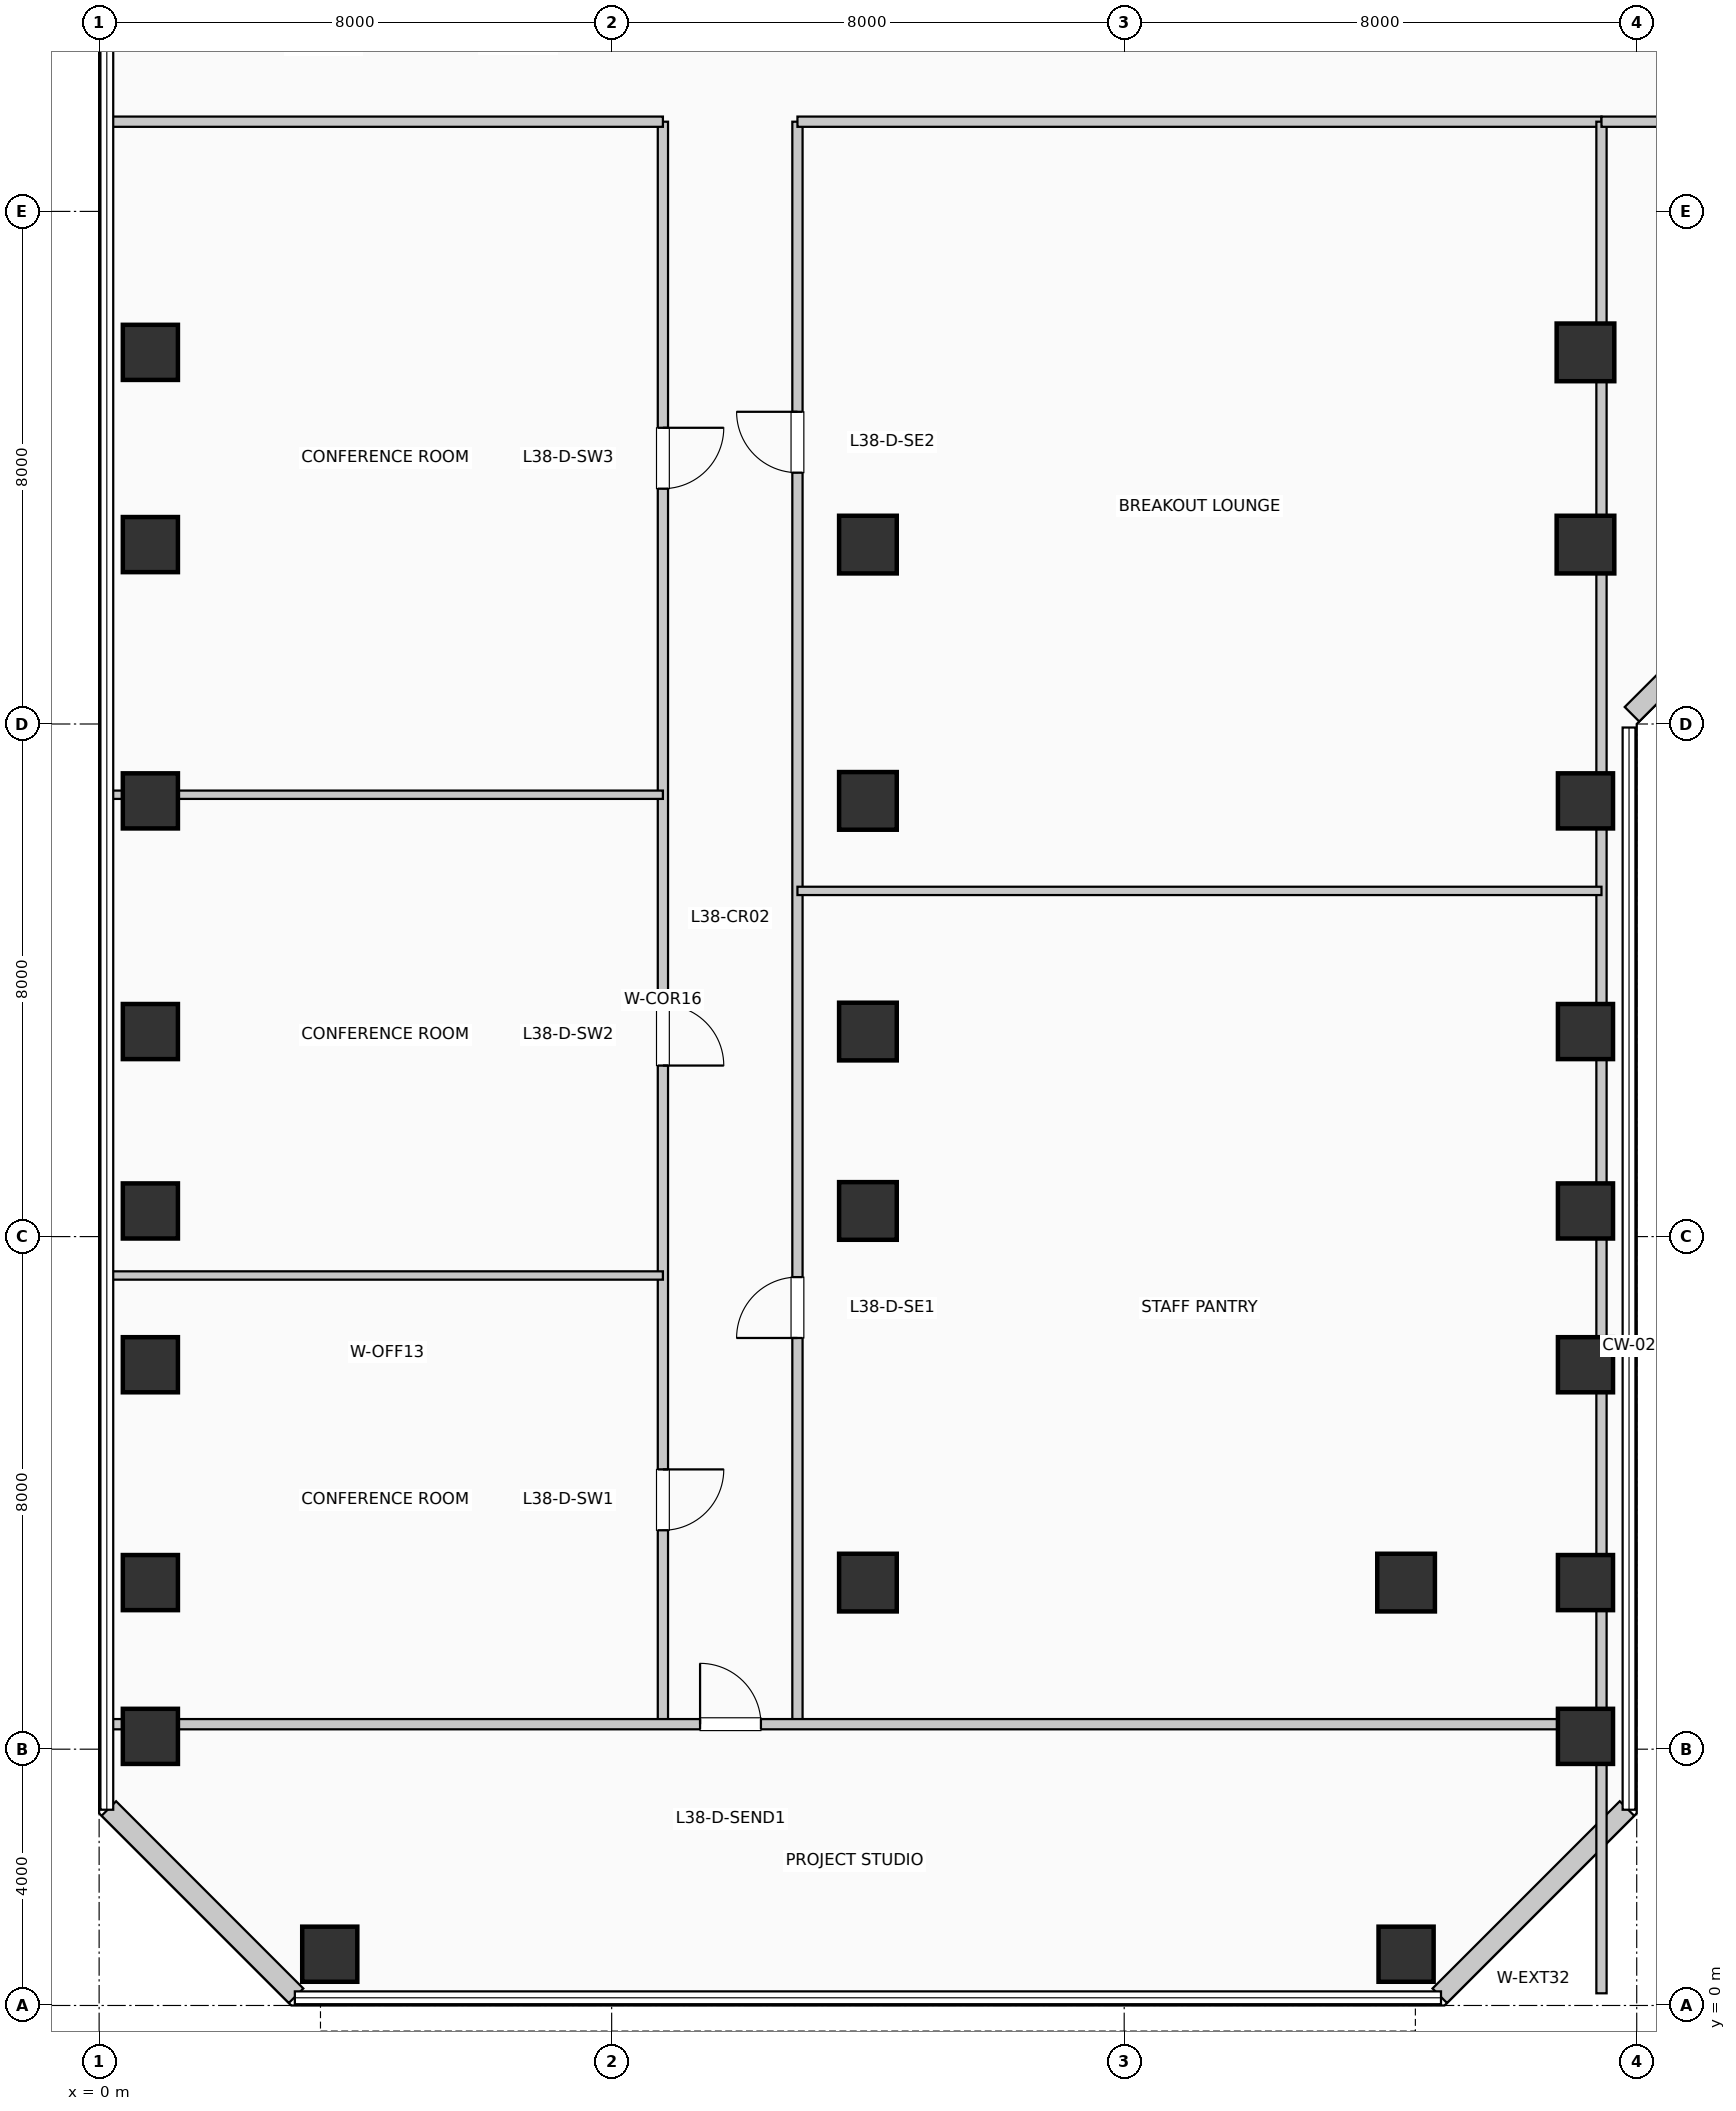
"""IFC4 building model, lengths in metres.
Left out: names, types, materials, properties, quantities, classifications, styles, units other than length and angle.
Written with IfcOpenShell. Run it as: python <this file> out.ifc"""

import sys

from ifc_helpers import new_model, si_unit, direction, frame, frame_2d, origin, origin_2d, place, context, subcontext, project, spatial, rectangle, extrude, element, fill, save


model = new_model("IFC4")
c1 = context("Model", 3, precision=1e-05, world=origin(), true_north=direction((0.0, 1.0)))
c2 = subcontext(c1, "Body", "Model", "MODEL_VIEW")
j1 = project(units=[si_unit("LENGTHUNIT", "METRE"), si_unit("PLANEANGLEUNIT", "RADIAN")], contexts=[c1])
p1 = place(None, origin())
s1 = spatial("IfcSite", under=j1, at=p1, CompositionType="ELEMENT")
p2 = place(p1, origin())
s2 = spatial("IfcBuilding", under=s1, at=p2, CompositionType="ELEMENT")
p3 = place(p2, frame((0.0, 0.0, 158.73)))
s3 = spatial("IfcBuildingStorey", under=s2, at=p3, CompositionType="ELEMENT", Elevation=158.73)
for number, where, z_axis, x_axis in (
    (1, (0.8, 4.2, 0.0), (0.0, 0.0, 1.0), (1.0, 0.0, 0.0)),
    (2, (0.8, 6.6, 0.0), (0.0, 0.0, 1.0), (1.0, 0.0, 0.0)),
    (3, (0.8, 10.0, 0.0), (0.0, 0.0, 1.0), (1.0, 0.0, 0.0)),
    (4, (0.8, 12.4, 0.0), (0.0, 0.0, 1.0), (1.0, 0.0, 0.0)),
    (5, (0.8, 15.2, 0.0), (0.0, 0.0, 1.0), (1.0, 0.0, 0.0)),
    (6, (0.8, 18.8, 0.0), (0.0, 0.0, 1.0), (1.0, 0.0, 0.0)),
    (7, (0.8, 22.8, 0.0), (0.0, 0.0, 1.0), (1.0, 0.0, 0.0)),
    (8, (0.8, 25.8, 0.0), (0.0, 0.0, 1.0), (1.0, 0.0, 0.0)),
    (9, (3.6, 0.8, 0.0), (0.0, 0.0, 1.0), (1.0, 0.0, 0.0)),
):
    element("IfcColumn", number, at=place(p3, frame(where, z_axis=z_axis, x_axis=x_axis)), inside=s3, PredefinedType="COLUMN", context=c2, shape_type="SweptSolid", body=[
        extrude(rectangle(XDim=0.86, YDim=0.86, at=origin_2d()), origin(), (0.0, 0.0, 1.0), 3.96),
    ])
for number, where, z_axis, x_axis in (
    (10, (12.0, 6.6, 0.0), (0.0, 0.0, 1.0), (1.0, 0.0, 0.0)),
    (11, (12.0, 12.4, 0.0), (0.0, 0.0, 1.0), (1.0, 0.0, 0.0)),
    (12, (12.0, 15.2, 0.0), (0.0, 0.0, 1.0), (1.0, 0.0, 0.0)),
    (13, (12.0, 18.8, 0.0), (0.0, 0.0, 1.0), (1.0, 0.0, 0.0)),
    (14, (12.0, 22.8, 0.0), (0.0, 0.0, 1.0), (1.0, 0.0, 0.0)),
):
    element("IfcColumn", number, at=place(p3, frame(where, z_axis=z_axis, x_axis=x_axis)), inside=s3, PredefinedType="COLUMN", context=c2, shape_type="SweptSolid", body=[
        extrude(rectangle(XDim=0.9, YDim=0.9, at=origin_2d()), origin(), (0.0, 0.0, 1.0), 3.96),
    ])
p4 = place(p3, frame((20.4, 0.8, 0.0), z_axis=(0.0, 0.0, 1.0), x_axis=(1.0, 0.0, 0.0)))
e15 = element("IfcColumn", 15, at=p4, inside=s3, PredefinedType="COLUMN", context=c2, shape_type="SweptSolid", body=[
    extrude(rectangle(XDim=0.86, YDim=0.86, at=origin_2d()), origin(), (0.0, 0.0, 1.0), 3.96),
])
p5 = place(p3, frame((20.4, 6.6, 0.0), z_axis=(0.0, 0.0, 1.0), x_axis=(1.0, 0.0, 0.0)))
e16 = element("IfcColumn", 16, at=p5, inside=s3, PredefinedType="COLUMN", context=c2, shape_type="SweptSolid", body=[
    extrude(rectangle(XDim=0.9, YDim=0.9, at=origin_2d()), origin(), (0.0, 0.0, 1.0), 3.96),
])
for number, where, z_axis, x_axis in (
    (17, (23.2, 4.2, 0.0), (0.0, 0.0, 1.0), (1.0, 0.0, 0.0)),
    (18, (23.2, 6.6, 0.0), (0.0, 0.0, 1.0), (1.0, 0.0, 0.0)),
    (19, (23.2, 10.0, 0.0), (0.0, 0.0, 1.0), (1.0, 0.0, 0.0)),
    (20, (23.2, 12.4, 0.0), (0.0, 0.0, 1.0), (1.0, 0.0, 0.0)),
    (21, (23.2, 15.2, 0.0), (0.0, 0.0, 1.0), (1.0, 0.0, 0.0)),
    (22, (23.2, 18.8, 0.0), (0.0, 0.0, 1.0), (1.0, 0.0, 0.0)),
):
    element("IfcColumn", number, at=place(p3, frame(where, z_axis=z_axis, x_axis=x_axis)), inside=s3, PredefinedType="COLUMN", context=c2, shape_type="SweptSolid", body=[
        extrude(rectangle(XDim=0.86, YDim=0.86, at=origin_2d()), origin(), (0.0, 0.0, 1.0), 3.96),
    ])
for number, where, z_axis, x_axis in (
    (23, (23.2, 22.8, 0.0), (0.0, 0.0, 1.0), (1.0, 0.0, 0.0)),
    (24, (23.2, 25.8, 0.0), (0.0, 0.0, 1.0), (1.0, 0.0, 0.0)),
):
    element("IfcColumn", number, at=place(p3, frame(where, z_axis=z_axis, x_axis=x_axis)), inside=s3, PredefinedType="COLUMN", context=c2, shape_type="SweptSolid", body=[
        extrude(rectangle(XDim=0.9, YDim=0.9, at=origin_2d()), origin(), (0.0, 0.0, 1.0), 3.96),
    ])
p6 = place(p3, frame((20.926, 0.152, 0.0), z_axis=(0.0, 0.0, 1.0), x_axis=(0.707106781187, 0.707106781187, 0.0)))
e25 = element("IfcWall", 25, at=p6, inside=s3, PredefinedType="SOLIDWALL", context=c2, shape_type="SweptSolid", body=[
    extrude(rectangle(XDim=4.133, YDim=0.32, at=frame_2d((2.066, 0.0))), origin(), (0.0, 0.0, 1.0), 3.71),
])
p7 = place(p3, frame((23.926, 20.152, 0.0), z_axis=(0.0, 0.0, 1.0), x_axis=(0.707106781187, 0.707106781187, 0.0)))
e26 = element("IfcWall", 26, at=p7, inside=s3, PredefinedType="SOLIDWALL", context=c2, shape_type="SweptSolid", body=[
    extrude(rectangle(XDim=2.718, YDim=0.32, at=frame_2d((1.359, 0.0))), origin(), (0.0, 0.0, 1.0), 3.71),
])
p8 = place(p3, frame((0.152, 3.074, 0.0), z_axis=(0.0, 0.0, 1.0), x_axis=(0.707106781187, -0.707106781187, 0.0)))
e27 = element("IfcWall", 27, at=p8, inside=s3, PredefinedType="SOLIDWALL", context=c2, shape_type="SweptSolid", body=[
    extrude(rectangle(XDim=4.133, YDim=0.32, at=frame_2d((2.066, 0.0))), origin(), (0.0, 0.0, 1.0), 3.71),
])
p9 = place(p3, frame((8.8, 4.39, 0.0), z_axis=(0.0, 0.0, 1.0), x_axis=(0.0, 1.0, 0.0)))
e28 = element("IfcWall", 28, at=p9, inside=s3, PredefinedType="PARTITIONING", context=c2, shape_type="SweptSolid", body=[
    extrude(rectangle(XDim=25.01, YDim=0.16, at=frame_2d((12.505, 0.0))), origin(), (0.0, 0.0, 1.0), 3.71),
])
p10 = place(p9, frame((3.976, 0.0, 0.0), z_axis=(0.0, 0.0, 1.0), x_axis=(-1.0, 0.0, 0.0)))
e29 = element("IfcOpeningElement", 29, at=p10, cuts=e28, PredefinedType="OPENING", context=c2, shape_type="SweptSolid", body=[
    extrude(rectangle(XDim=0.95, YDim=2.15, at=frame_2d((0.475, 1.075))), frame((0.0, 0.09, 0.0), z_axis=(0.0, -1.0, 0.0), x_axis=(1.0, 0.0, 0.0)), (0.0, 0.0, 1.0), 0.18),
])
p11 = place(p9, frame((11.229, 0.0, 0.0), z_axis=(0.0, 0.0, 1.0), x_axis=(-1.0, 0.0, 0.0)))
e30 = element("IfcOpeningElement", 30, at=p11, cuts=e28, PredefinedType="OPENING", context=c2, shape_type="SweptSolid", body=[
    extrude(rectangle(XDim=0.95, YDim=2.15, at=frame_2d((0.475, 1.075))), frame((0.0, 0.09, 0.0), z_axis=(0.0, -1.0, 0.0), x_axis=(1.0, 0.0, 0.0)), (0.0, 0.0, 1.0), 0.18),
])
p12 = place(p9, frame((20.233, 0.0, 0.0), z_axis=(0.0, 0.0, 1.0), x_axis=(-1.0, 0.0, 0.0)))
e31 = element("IfcOpeningElement", 31, at=p12, cuts=e28, PredefinedType="OPENING", context=c2, shape_type="SweptSolid", body=[
    extrude(rectangle(XDim=0.95, YDim=2.15, at=frame_2d((0.475, 1.075))), frame((0.0, 0.09, 0.0), z_axis=(0.0, -1.0, 0.0), x_axis=(1.0, 0.0, 0.0)), (0.0, 0.0, 1.0), 0.18),
])
p13 = place(p3, frame((10.9, 4.39, 0.0), z_axis=(0.0, 0.0, 1.0), x_axis=(0.0, 1.0, 0.0)))
e32 = element("IfcWall", 32, at=p13, inside=s3, PredefinedType="PARTITIONING", context=c2, shape_type="SweptSolid", body=[
    extrude(rectangle(XDim=25.01, YDim=0.16, at=frame_2d((12.505, 0.0))), origin(), (0.0, 0.0, 1.0), 3.71),
])
p14 = place(p13, frame((6.028, 0.0, 0.0)))
e33 = element("IfcOpeningElement", 33, at=p14, cuts=e32, PredefinedType="OPENING", context=c2, shape_type="SweptSolid", body=[
    extrude(rectangle(XDim=0.95, YDim=2.15, at=frame_2d((0.475, 1.075))), frame((0.0, 0.09, 0.0), z_axis=(0.0, -1.0, 0.0), x_axis=(1.0, 0.0, 0.0)), (0.0, 0.0, 1.0), 0.18),
])
p15 = place(p13, frame((19.533, 0.0, 0.0)))
e34 = element("IfcOpeningElement", 34, at=p15, cuts=e32, PredefinedType="OPENING", context=c2, shape_type="SweptSolid", body=[
    extrude(rectangle(XDim=0.95, YDim=2.15, at=frame_2d((0.475, 1.075))), frame((0.0, 0.09, 0.0), z_axis=(0.0, -1.0, 0.0), x_axis=(1.0, 0.0, 0.0)), (0.0, 0.0, 1.0), 0.18),
])
p16 = place(p3, frame((0.19, 4.39, 0.0), z_axis=(0.0, 0.0, 1.0), x_axis=(1.0, 0.0, 0.0)))
e35 = element("IfcWall", 35, at=p16, inside=s3, PredefinedType="PARTITIONING", context=c2, shape_type="SweptSolid", body=[
    extrude(rectangle(XDim=23.26, YDim=0.16, at=frame_2d((11.63, 0.0))), origin(), (0.0, 0.0, 1.0), 3.045),
])
p17 = place(p16, frame((9.19, 0.0, 0.0)))
e36 = element("IfcOpeningElement", 36, at=p17, cuts=e35, PredefinedType="OPENING", context=c2, shape_type="SweptSolid", body=[
    extrude(rectangle(XDim=0.95, YDim=2.15, at=frame_2d((0.475, 1.075))), frame((0.0, 0.09, 0.0), z_axis=(0.0, -1.0, 0.0), x_axis=(1.0, 0.0, 0.0)), (0.0, 0.0, 1.0), 0.18),
])
p18 = place(p3, frame((0.19, 29.4, 0.0), z_axis=(0.0, 0.0, 1.0), x_axis=(1.0, 0.0, 0.0)))
e37 = element("IfcWall", 37, at=p18, inside=s3, PredefinedType="PARTITIONING", context=c2, shape_type="SweptSolid", body=[
    extrude(rectangle(XDim=8.61, YDim=0.16, at=frame_2d((4.305, 0.0))), origin(), (0.0, 0.0, 1.0), 3.365),
])
p19 = place(p3, frame((10.9, 29.4, 0.0), z_axis=(0.0, 0.0, 1.0), x_axis=(1.0, 0.0, 0.0)))
e38 = element("IfcWall", 38, at=p19, inside=s3, PredefinedType="PARTITIONING", context=c2, shape_type="SweptSolid", body=[
    extrude(rectangle(XDim=12.55, YDim=0.16, at=frame_2d((6.275, 0.0))), origin(), (0.0, 0.0, 1.0), 3.365),
])
p20 = place(p3, frame((23.45, 0.19, 0.0), z_axis=(0.0, 0.0, 1.0), x_axis=(0.0, 1.0, 0.0)))
e39 = element("IfcWall", 39, at=p20, inside=s3, PredefinedType="PARTITIONING", context=c2, shape_type="SweptSolid", body=[
    extrude(rectangle(XDim=29.21, YDim=0.16, at=frame_2d((14.605, 0.0))), origin(), (0.0, 0.0, 1.0), 3.045),
])
p21 = place(p3, frame((0.19, 11.393, 0.0), z_axis=(0.0, 0.0, 1.0), x_axis=(1.0, 0.0, 0.0)))
e40 = element("IfcWall", 40, at=p21, inside=s3, PredefinedType="PARTITIONING", context=c2, shape_type="SweptSolid", body=[
    extrude(rectangle(XDim=8.61, YDim=0.13, at=frame_2d((4.305, 0.0))), origin(), (0.0, 0.0, 1.0), 3.71),
])
p22 = place(p3, frame((0.19, 18.896, 0.0), z_axis=(0.0, 0.0, 1.0), x_axis=(1.0, 0.0, 0.0)))
e41 = element("IfcWall", 41, at=p22, inside=s3, PredefinedType="PARTITIONING", context=c2, shape_type="SweptSolid", body=[
    extrude(rectangle(XDim=8.61, YDim=0.13, at=frame_2d((4.305, 0.0))), origin(), (0.0, 0.0, 1.0), 3.045),
])
p23 = place(p3, frame((10.9, 17.395, 0.0), z_axis=(0.0, 0.0, 1.0), x_axis=(1.0, 0.0, 0.0)))
e42 = element("IfcWall", 42, at=p23, inside=s3, PredefinedType="PARTITIONING", context=c2, shape_type="SweptSolid", body=[
    extrude(rectangle(XDim=12.55, YDim=0.13, at=frame_2d((6.275, 0.0))), origin(), (0.0, 0.0, 1.0), 3.71),
])
p24 = place(p3, frame((23.45, 29.4, 0.0), z_axis=(0.0, 0.0, 1.0), x_axis=(1.0, 0.0, 0.0)))
e43 = element("IfcWall", 43, at=p24, inside=s3, PredefinedType="PARTITIONING", context=c2, shape_type="SweptSolid", body=[
    extrude(rectangle(XDim=26.56, YDim=0.16, at=frame_2d((13.28, 0.0))), origin(), (0.0, 0.0, 1.0), 3.365),
])
p25 = place(p24, frame((3.396, 0.0, 0.0), z_axis=(0.0, 0.0, 1.0), x_axis=(-1.0, 0.0, 0.0)))
e44 = element("IfcOpeningElement", 44, at=p25, cuts=e43, PredefinedType="OPENING", context=c2, shape_type="SweptSolid", body=[
    extrude(rectangle(XDim=0.95, YDim=2.15, at=frame_2d((0.475, 1.075))), frame((0.0, 0.09, 0.0), z_axis=(0.0, -1.0, 0.0), x_axis=(1.0, 0.0, 0.0)), (0.0, 0.0, 1.0), 0.18),
])
p26 = place(p24, frame((9.771, 0.0, 0.0), z_axis=(0.0, 0.0, 1.0), x_axis=(-1.0, 0.0, 0.0)))
e45 = element("IfcOpeningElement", 45, at=p26, cuts=e43, PredefinedType="OPENING", context=c2, shape_type="SweptSolid", body=[
    extrude(rectangle(XDim=0.95, YDim=2.15, at=frame_2d((0.475, 1.075))), frame((0.0, 0.09, 0.0), z_axis=(0.0, -1.0, 0.0), x_axis=(1.0, 0.0, 0.0)), (0.0, 0.0, 1.0), 0.18),
])
p27 = place(p24, frame((16.942, 0.0, 0.0), z_axis=(0.0, 0.0, 1.0), x_axis=(-1.0, 0.0, 0.0)))
e46 = element("IfcOpeningElement", 46, at=p27, cuts=e43, PredefinedType="OPENING", context=c2, shape_type="SweptSolid", body=[
    extrude(rectangle(XDim=0.95, YDim=2.15, at=frame_2d((0.475, 1.075))), frame((0.0, 0.09, 0.0), z_axis=(0.0, -1.0, 0.0), x_axis=(1.0, 0.0, 0.0)), (0.0, 0.0, 1.0), 0.18),
])
p28 = place(p24, frame((23.848, 0.0, 0.0), z_axis=(0.0, 0.0, 1.0), x_axis=(-1.0, 0.0, 0.0)))
e47 = element("IfcOpeningElement", 47, at=p28, cuts=e43, PredefinedType="OPENING", context=c2, shape_type="SweptSolid", body=[
    extrude(rectangle(XDim=0.95, YDim=2.15, at=frame_2d((0.475, 1.075))), frame((0.0, 0.09, 0.0), z_axis=(0.0, -1.0, 0.0), x_axis=(1.0, 0.0, 0.0)), (0.0, 0.0, 1.0), 0.18),
])
p29 = place(p17, origin())
e48 = element("IfcDoor", 48, at=p29, inside=s3, OperationType="SINGLE_SWING_LEFT", PredefinedType="DOOR", context=c2, shape_type="SweptSolid", body=[
    extrude(rectangle(XDim=0.95, YDim=2.15, at=frame_2d((0.475, 1.075))), frame((0.0, 0.025, 0.0), z_axis=(0.0, -1.0, 0.0), x_axis=(1.0, 0.0, 0.0)), (0.0, 0.0, 1.0), 0.05),
])
fill(e36, e48)
p30 = place(p10, origin())
e49 = element("IfcDoor", 49, at=p30, inside=s3, OperationType="SINGLE_SWING_RIGHT", PredefinedType="DOOR", context=c2, shape_type="SweptSolid", body=[
    extrude(rectangle(XDim=0.95, YDim=2.15, at=frame_2d((0.475, 1.075))), frame((0.0, 0.025, 0.0), z_axis=(0.0, -1.0, 0.0), x_axis=(1.0, 0.0, 0.0)), (0.0, 0.0, 1.0), 0.05),
])
fill(e29, e49)
p31 = place(p11, origin())
e50 = element("IfcDoor", 50, at=p31, inside=s3, OperationType="SINGLE_SWING_LEFT", PredefinedType="DOOR", context=c2, shape_type="SweptSolid", body=[
    extrude(rectangle(XDim=0.95, YDim=2.15, at=frame_2d((0.475, 1.075))), frame((0.0, 0.025, 0.0), z_axis=(0.0, -1.0, 0.0), x_axis=(1.0, 0.0, 0.0)), (0.0, 0.0, 1.0), 0.05),
])
fill(e30, e50)
p32 = place(p12, origin())
e51 = element("IfcDoor", 51, at=p32, inside=s3, OperationType="SINGLE_SWING_RIGHT", PredefinedType="DOOR", context=c2, shape_type="SweptSolid", body=[
    extrude(rectangle(XDim=0.95, YDim=2.15, at=frame_2d((0.475, 1.075))), frame((0.0, 0.025, 0.0), z_axis=(0.0, -1.0, 0.0), x_axis=(1.0, 0.0, 0.0)), (0.0, 0.0, 1.0), 0.05),
])
fill(e31, e51)
p33 = place(p14, origin())
e52 = element("IfcDoor", 52, at=p33, inside=s3, OperationType="SINGLE_SWING_LEFT", PredefinedType="DOOR", context=c2, shape_type="SweptSolid", body=[
    extrude(rectangle(XDim=0.95, YDim=2.15, at=frame_2d((0.475, 1.075))), frame((0.0, 0.025, 0.0), z_axis=(0.0, -1.0, 0.0), x_axis=(1.0, 0.0, 0.0)), (0.0, 0.0, 1.0), 0.05),
])
fill(e33, e52)
p34 = place(p15, origin())
e53 = element("IfcDoor", 53, at=p34, inside=s3, OperationType="SINGLE_SWING_RIGHT", PredefinedType="DOOR", context=c2, shape_type="SweptSolid", body=[
    extrude(rectangle(XDim=0.95, YDim=2.15, at=frame_2d((0.475, 1.075))), frame((0.0, 0.025, 0.0), z_axis=(0.0, -1.0, 0.0), x_axis=(1.0, 0.0, 0.0)), (0.0, 0.0, 1.0), 0.05),
])
fill(e34, e53)
save(model, sys.argv[1])
